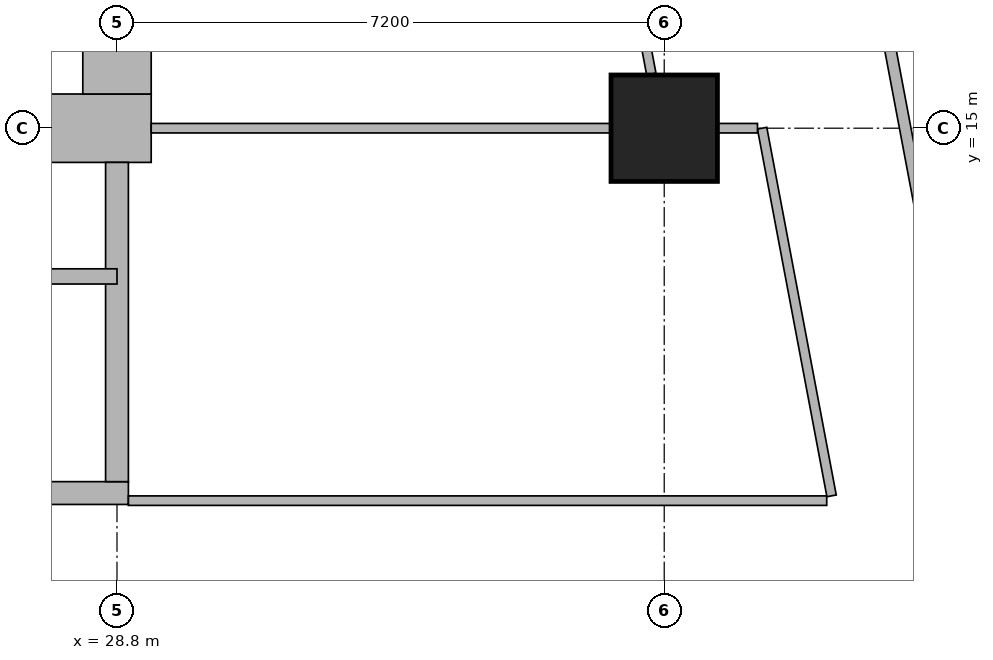
"""IFC4 building model, lengths in metres.
Left out: names, types, materials, properties, quantities, classifications, styles, units other than length and angle.
Written with IfcOpenShell. Run it as: python <this file> out.ifc"""

import sys

from ifc_helpers import new_model, si_unit, direction, frame, frame_2d, origin, origin_2d, place, context, subcontext, project, spatial, rectangle, extrude, element, fill, save


model = new_model("IFC4")
c1 = context("Model", 3, precision=1e-05, world=origin(), true_north=direction((0.0, 1.0)))
c2 = subcontext(c1, "Body", "Model", "MODEL_VIEW")
j1 = project(units=[si_unit("LENGTHUNIT", "METRE"), si_unit("PLANEANGLEUNIT", "RADIAN")], contexts=[c1])
p1 = place(None, origin())
s1 = spatial("IfcSite", under=j1, at=p1, CompositionType="ELEMENT")
p2 = place(p1, origin())
s2 = spatial("IfcBuilding", under=s1, at=p2, CompositionType="ELEMENT")
p3 = place(p2, frame((0.0, 0.0, 285.35)))
s3 = spatial("IfcBuildingStorey", under=s2, at=p3, CompositionType="ELEMENT", Elevation=285.35)
p4 = place(p3, frame((36.0, 15.0, 0.0), z_axis=(0.0, 0.0, 1.0), x_axis=(1.0, 0.0, 0.0)))
e1 = element("IfcColumn", 1, at=p4, inside=s3, PredefinedType="COLUMN", context=c2, shape_type="SweptSolid", body=[
    extrude(rectangle(XDim=1.4, YDim=1.4, at=origin_2d()), origin(), (0.0, 0.0, 1.0), 3.75),
])
p5 = place(p3, frame((13.95, 15.0, 0.0), z_axis=(0.0, 0.0, 1.0), x_axis=(1.0, 0.0, 0.0)))
e2 = element("IfcWall", 2, at=p5, inside=s3, PredefinedType="SHEAR", context=c2, shape_type="SweptSolid", body=[
    extrude(rectangle(XDim=15.3, YDim=0.9, at=frame_2d((7.65, 0.0))), origin(), (0.0, 0.0, 1.0), 3.75),
])
p6 = place(p5, frame((4.45, 0.0, 0.0)))
e3 = element("IfcOpeningElement", 3, at=p6, cuts=e2, PredefinedType="OPENING", context=c2, shape_type="SweptSolid", body=[
    extrude(rectangle(XDim=1.8, YDim=2.1, at=frame_2d((0.9, 1.05))), frame((0.0, 0.46, 0.0), z_axis=(0.0, -1.0, 0.0), x_axis=(1.0, 0.0, 0.0)), (0.0, 0.0, 1.0), 0.92),
])
p7 = place(p5, frame((10.7, 0.0, 0.0)))
e4 = element("IfcOpeningElement", 4, at=p7, cuts=e2, PredefinedType="OPENING", context=c2, shape_type="SweptSolid", body=[
    extrude(rectangle(XDim=1.1, YDim=2.1, at=frame_2d((0.55, 1.05))), frame((0.0, 0.46, 0.0), z_axis=(0.0, -1.0, 0.0), x_axis=(1.0, 0.0, 0.0)), (0.0, 0.0, 1.0), 0.92),
])
p8 = place(p3, frame((28.8, 15.45, 0.0), z_axis=(0.0, 0.0, 1.0), x_axis=(0.0, 1.0, 0.0)))
e5 = element("IfcWall", 5, at=p8, inside=s3, PredefinedType="SHEAR", context=c2, shape_type="SweptSolid", body=[
    extrude(rectangle(XDim=14.1, YDim=0.9, at=frame_2d((7.05, 0.0))), origin(), (0.0, 0.0, 1.0), 3.75),
])
p9 = place(p3, frame((21.45, 10.2, 0.0), z_axis=(0.0, 0.0, 1.0), x_axis=(1.0, 0.0, 0.0)))
e6 = element("IfcWall", 6, at=p9, inside=s3, PredefinedType="SHEAR", context=c2, shape_type="SweptSolid", body=[
    extrude(rectangle(XDim=7.5, YDim=0.3, at=frame_2d((3.75, 0.0))), origin(), (0.0, 0.0, 1.0), 3.75),
])
p10 = place(p9, frame((1.2, 0.0, 0.0)))
e7 = element("IfcOpeningElement", 7, at=p10, cuts=e6, PredefinedType="OPENING", context=c2, shape_type="SweptSolid", body=[
    extrude(rectangle(XDim=1.1, YDim=2.1, at=frame_2d((0.55, 1.05))), frame((0.0, 0.16, 0.0), z_axis=(0.0, -1.0, 0.0), x_axis=(1.0, 0.0, 0.0)), (0.0, 0.0, 1.0), 0.32),
])
p11 = place(p3, frame((28.8, 10.35, 0.0), z_axis=(0.0, 0.0, 1.0), x_axis=(0.0, 1.0, 0.0)))
e8 = element("IfcWall", 8, at=p11, inside=s3, PredefinedType="SHEAR", context=c2, shape_type="SweptSolid", body=[
    extrude(rectangle(XDim=4.2, YDim=0.3, at=frame_2d((2.1, 0.0))), origin(), (0.0, 0.0, 1.0), 3.75),
])
p12 = place(p3, frame((34.036, 42.186, 0.0), z_axis=(0.0, 0.0, 1.0), x_axis=(0.185593518645, -0.9826266055, 0.0)))
e9 = element("IfcWall", 9, at=p12, inside=s3, PredefinedType="SOLIDWALL", context=c2, shape_type="SweptSolid", body=[
    extrude(rectangle(XDim=35.961, YDim=0.15, at=frame_2d((17.98, 0.0))), origin(), (0.0, 0.0, 1.0), 2.5),
])
p13 = place(p12, frame((19.345, 0.0, 0.0)))
e10 = element("IfcOpeningElement", 10, at=p13, cuts=e9, PredefinedType="OPENING", context=c2, shape_type="SweptSolid", body=[
    extrude(rectangle(XDim=1.0, YDim=2.1, at=frame_2d((0.5, 1.05))), frame((0.0, 0.085, 0.0), z_axis=(0.0, -1.0, 0.0), x_axis=(1.0, 0.0, 0.0)), (0.0, 0.0, 1.0), 0.17),
])
p14 = place(p12, frame((33.774, 0.0, 0.0)))
e11 = element("IfcOpeningElement", 11, at=p14, cuts=e9, PredefinedType="OPENING", context=c2, shape_type="SweptSolid", body=[
    extrude(rectangle(XDim=1.0, YDim=2.1, at=frame_2d((0.5, 1.05))), frame((0.0, 0.085, 0.0), z_axis=(0.0, -1.0, 0.0), x_axis=(1.0, 0.0, 0.0)), (0.0, 0.0, 1.0), 0.17),
])
p15 = place(p3, frame((28.95, 10.1, 0.0), z_axis=(0.0, 0.0, 1.0), x_axis=(1.0, 0.0, 0.0)))
e12 = element("IfcWall", 12, at=p15, inside=s3, PredefinedType="PARTITIONING", context=c2, shape_type="SweptSolid", body=[
    extrude(rectangle(XDim=9.188, YDim=0.125, at=frame_2d((4.594, 0.0))), origin(), (0.0, 0.0, 1.0), 3.5),
])
p16 = place(p3, frame((38.202, 10.163, 0.0), z_axis=(0.0, 0.0, 1.0), x_axis=(-0.185641892853, 0.982617467593, 0.0)))
e13 = element("IfcWall", 13, at=p16, inside=s3, PredefinedType="PARTITIONING", context=c2, shape_type="SweptSolid", body=[
    extrude(rectangle(XDim=4.922, YDim=0.125, at=frame_2d((2.461, 0.0))), origin(), (0.0, 0.0, 1.0), 3.5),
])
p17 = place(p16, frame((0.708, 0.0, 0.0)))
e14 = element("IfcOpeningElement", 14, at=p17, cuts=e13, PredefinedType="OPENING", context=c2, shape_type="SweptSolid", body=[
    extrude(rectangle(XDim=1.0, YDim=2.1, at=frame_2d((0.5, 1.05))), frame((0.0, 0.073, 0.0), z_axis=(0.0, -1.0, 0.0), x_axis=(1.0, 0.0, 0.0)), (0.0, 0.0, 1.0), 0.145),
])
p18 = place(p3, frame((35.83, 15.713, 0.0), z_axis=(0.0, 0.0, 1.0), x_axis=(-0.185534724166, 0.982637708481, 0.0)))
e15 = element("IfcWall", 15, at=p18, inside=s3, PredefinedType="PARTITIONING", context=c2, shape_type="SweptSolid", body=[
    extrude(rectangle(XDim=13.814, YDim=0.125, at=frame_2d((6.907, 0.0))), origin(), (0.0, 0.0, 1.0), 2.5),
])
p19 = place(p18, frame((5.35, 0.0, 0.0)))
e16 = element("IfcOpeningElement", 16, at=p19, cuts=e15, PredefinedType="OPENING", context=c2, shape_type="SweptSolid", body=[
    extrude(rectangle(XDim=1.0, YDim=2.1, at=frame_2d((0.5, 1.05))), frame((0.0, 0.073, 0.0), z_axis=(0.0, -1.0, 0.0), x_axis=(1.0, 0.0, 0.0)), (0.0, 0.0, 1.0), 0.145),
])
p20 = place(p3, frame((29.25, 15.0, 0.0), z_axis=(0.0, 0.0, 1.0), x_axis=(1.0, 0.0, 0.0)))
e17 = element("IfcWall", 17, at=p20, inside=s3, PredefinedType="PARTITIONING", context=c2, shape_type="SweptSolid", body=[
    extrude(rectangle(XDim=6.049, YDim=0.125, at=frame_2d((3.024, 0.0))), origin(), (0.0, 0.0, 1.0), 3.5),
])
p21 = place(p3, frame((36.701, 15.0, 0.0), z_axis=(0.0, 0.0, 1.0), x_axis=(1.0, 0.0, 0.0)))
e18 = element("IfcWall", 18, at=p21, inside=s3, PredefinedType="PARTITIONING", context=c2, shape_type="SweptSolid", body=[
    extrude(rectangle(XDim=0.526, YDim=0.125, at=frame_2d((0.263, 0.0))), origin(), (0.0, 0.0, 1.0), 3.5),
])
p22 = place(p3, frame((23.0, 13.05, 0.0), z_axis=(0.0, 0.0, 1.0), x_axis=(1.0, 0.0, 0.0)))
e19 = element("IfcWall", 19, at=p22, inside=s3, PredefinedType="SHEAR", context=c2, shape_type="SweptSolid", body=[
    extrude(rectangle(XDim=5.8, YDim=0.2, at=frame_2d((2.9, 0.0))), origin(), (0.0, 0.0, 1.0), 3.75),
])
p23 = place(p17, origin())
e20 = element("IfcDoor", 20, at=p23, inside=s3, OperationType="SINGLE_SWING_LEFT", PredefinedType="DOOR", context=c2, shape_type="SweptSolid", body=[
    extrude(rectangle(XDim=1.0, YDim=2.1, at=frame_2d((0.5, 1.05))), frame((0.0, 0.025, 0.0), z_axis=(0.0, -1.0, 0.0), x_axis=(1.0, 0.0, 0.0)), (0.0, 0.0, 1.0), 0.05),
])
fill(e14, e20)
save(model, sys.argv[1])
